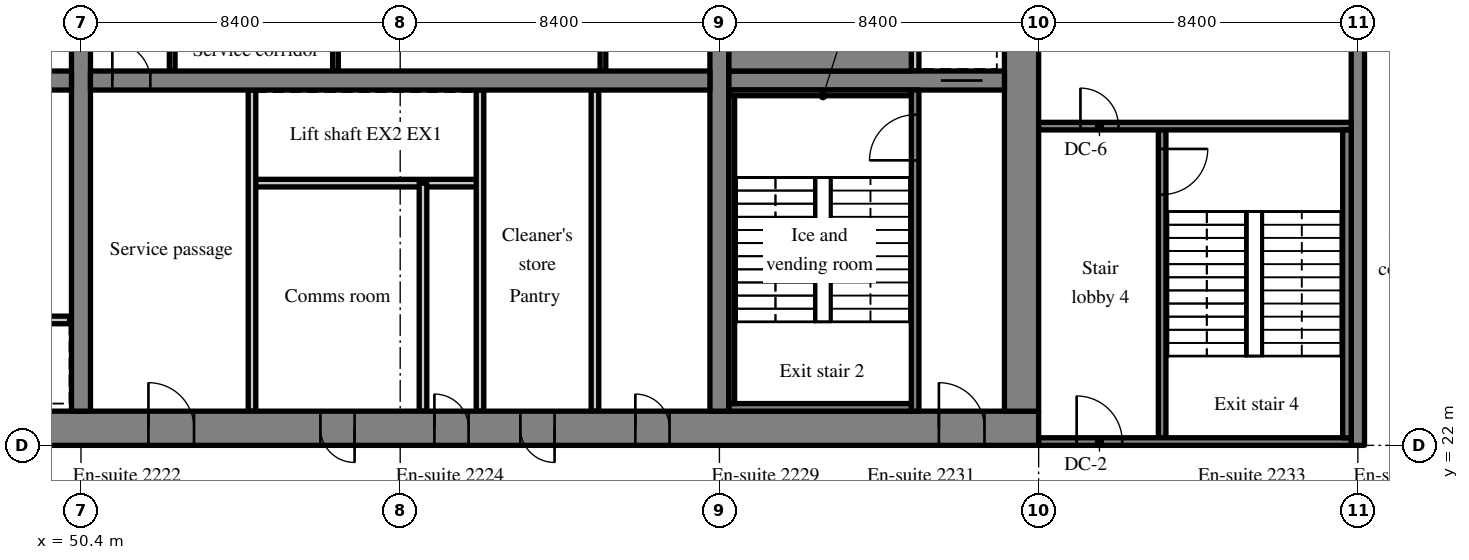
"""IFC4 building model, lengths in metres.
Left out: names, types, materials, properties, quantities, classifications, styles, units other than length and angle.
Written with IfcOpenShell. Run it as: python <this file> out.ifc"""

import sys

from ifc_helpers import new_model, si_unit, direction, frame, frame_2d, origin, place, context, subcontext, project, spatial, rectangle, extrude, source, transform, mapped, element, fill, save


model = new_model("IFC4")
c1 = context("Model", 3, precision=1e-05, world=origin(), true_north=direction((0.0, 1.0)))
c2 = subcontext(c1, "Body", "Model", "MODEL_VIEW")
j1 = project(units=[si_unit("LENGTHUNIT", "METRE"), si_unit("PLANEANGLEUNIT", "RADIAN")], contexts=[c1])
p1 = place(None, origin())
s1 = spatial("IfcSite", under=j1, at=p1, CompositionType="ELEMENT")
p2 = place(p1, origin())
s2 = spatial("IfcBuilding", under=s1, at=p2, CompositionType="ELEMENT")
p3 = place(p2, frame((0.0, 0.0, 95.2)))
s3 = spatial("IfcBuildingStorey", under=s2, at=p3, CompositionType="ELEMENT", Elevation=95.2)
m1 = source(origin(), c2, "Body", "SweptSolid", [
    extrude(rectangle(XDim=50.4, YDim=0.9, at=frame_2d((25.2, 0.0))), origin(), (0.0, 0.0, 1.0), 3.52),
])
p4 = place(p3, frame((25.2, 22.45, 0.0), z_axis=(0.0, 0.0, 1.0), x_axis=(1.0, 0.0, 0.0)))
e1 = element("IfcWall", 1, at=p4, inside=s3, PredefinedType="SHEAR", context=c2, shape_type="MappedRepresentation", body=[
    mapped(m1, transform((0.0, 0.0, 0.0), scale=1.0)),
])
m2 = source(origin(), c2, "Body", "SweptSolid", [
    extrude(rectangle(XDim=1.8, YDim=2.1, at=frame_2d((0.9, 1.05))), frame((0.0, 0.46, 0.0), z_axis=(0.0, -1.0, 0.0), x_axis=(1.0, 0.0, 0.0)), (0.0, 0.0, 1.0), 0.92),
])
p5 = place(p4, frame((15.9, 0.0, 0.0)))
e2 = element("IfcOpeningElement", 2, at=p5, cuts=e1, PredefinedType="OPENING", context=c2, shape_type="MappedRepresentation", body=[
    mapped(m2, transform((0.0, 0.0, 0.0), scale=1.0)),
])
m3 = source(origin(), c2, "Body", "SweptSolid", [
    extrude(rectangle(XDim=1.2, YDim=2.1, at=frame_2d((0.6, 1.05))), frame((0.0, 0.46, 0.0), z_axis=(0.0, -1.0, 0.0), x_axis=(1.0, 0.0, 0.0)), (0.0, 0.0, 1.0), 0.92),
])
p6 = place(p4, frame((26.975, 0.0, 0.0)))
e3 = element("IfcOpeningElement", 3, at=p6, cuts=e1, PredefinedType="OPENING", context=c2, shape_type="MappedRepresentation", body=[
    mapped(m3, transform((0.0, 0.0, 0.0), scale=1.0)),
])
m4 = source(origin(), c2, "Body", "SweptSolid", [
    extrude(rectangle(XDim=0.9, YDim=2.1, at=frame_2d((0.45, 1.05))), frame((0.0, 0.46, 0.0), z_axis=(0.0, -1.0, 0.0), x_axis=(1.0, 0.0, 0.0)), (0.0, 0.0, 1.0), 0.92),
])
p7 = place(p4, frame((34.5, 0.0, 0.0)))
e4 = element("IfcOpeningElement", 4, at=p7, cuts=e1, PredefinedType="OPENING", context=c2, shape_type="MappedRepresentation", body=[
    mapped(m4, transform((0.0, 0.0, 0.0), scale=1.0)),
])
p8 = place(p4, frame((31.5, 0.0, 0.0)))
e5 = element("IfcOpeningElement", 5, at=p8, cuts=e1, PredefinedType="OPENING", context=c2, shape_type="MappedRepresentation", body=[
    mapped(m4, transform((0.0, 0.0, 0.0), scale=1.0)),
])
p9 = place(p4, frame((39.788, 0.0, 0.0)))
e6 = element("IfcOpeningElement", 6, at=p9, cuts=e1, PredefinedType="OPENING", context=c2, shape_type="MappedRepresentation", body=[
    mapped(m4, transform((0.0, 0.0, 0.0), scale=1.0)),
])
p10 = place(p4, frame((36.762, 0.0, 0.0)))
e7 = element("IfcOpeningElement", 7, at=p10, cuts=e1, PredefinedType="OPENING", context=c2, shape_type="MappedRepresentation", body=[
    mapped(m4, transform((0.0, 0.0, 0.0), scale=1.0)),
])
p11 = place(p4, frame((6.45, 0.0, 0.0)))
e8 = element("IfcOpeningElement", 8, at=p11, cuts=e1, PredefinedType="OPENING", context=c2, shape_type="MappedRepresentation", body=[
    mapped(m3, transform((0.0, 0.0, 0.0), scale=1.0)),
])
p12 = place(p4, frame((47.775, 0.0, 0.0)))
e9 = element("IfcOpeningElement", 9, at=p12, cuts=e1, PredefinedType="OPENING", context=c2, shape_type="MappedRepresentation", body=[
    mapped(m3, transform((0.0, 0.0, 0.0), scale=1.0)),
])
m5 = source(origin(), c2, "Body", "SweptSolid", [
    extrude(rectangle(XDim=18.2, YDim=0.9, at=frame_2d((9.1, 0.0))), origin(), (0.0, 0.0, 1.0), 3.52),
])
p13 = place(p3, frame((75.15, 22.9, 0.0), z_axis=(0.0, 0.0, 1.0), x_axis=(0.0, 1.0, 0.0)))
e10 = element("IfcWall", 10, at=p13, inside=s3, PredefinedType="SHEAR", context=c2, shape_type="MappedRepresentation", body=[
    mapped(m5, transform((0.0, 0.0, 0.0), scale=1.0)),
])
p14 = place(p13, frame((12.5, 0.0, 0.0)))
e11 = element("IfcOpeningElement", 11, at=p14, cuts=e10, PredefinedType="OPENING", context=c2, shape_type="MappedRepresentation", body=[
    mapped(m3, transform((0.0, 0.0, 0.0), scale=1.0)),
])
m6 = source(origin(), c2, "Body", "SweptSolid", [
    extrude(rectangle(XDim=18.2, YDim=0.5, at=frame_2d((9.1, 0.0))), origin(), (0.0, 0.0, 1.0), 3.52),
])
p15 = place(p3, frame((50.4, 22.9, 0.0), z_axis=(0.0, 0.0, 1.0), x_axis=(0.0, 1.0, 0.0)))
e12 = element("IfcWall", 12, at=p15, inside=s3, PredefinedType="SHEAR", context=c2, shape_type="MappedRepresentation", body=[
    mapped(m6, transform((0.0, 0.0, 0.0), scale=1.0)),
])
m7 = source(origin(), c2, "Body", "SweptSolid", [
    extrude(rectangle(XDim=1.1, YDim=2.1, at=frame_2d((0.55, 1.05))), frame((0.0, 0.26, 0.0), z_axis=(0.0, -1.0, 0.0), x_axis=(1.0, 0.0, 0.0)), (0.0, 0.0, 1.0), 0.52),
])
p16 = place(p15, frame((12.55, 0.0, 0.0)))
e13 = element("IfcOpeningElement", 13, at=p16, cuts=e12, PredefinedType="OPENING", context=c2, shape_type="MappedRepresentation", body=[
    mapped(m7, transform((0.0, 0.0, 0.0), scale=1.0)),
])
p17 = place(p3, frame((67.2, 22.9, 0.0), z_axis=(0.0, 0.0, 1.0), x_axis=(0.0, 1.0, 0.0)))
e14 = element("IfcWall", 14, at=p17, inside=s3, PredefinedType="SHEAR", context=c2, shape_type="MappedRepresentation", body=[
    mapped(m6, transform((0.0, 0.0, 0.0), scale=1.0)),
])
m8 = source(origin(), c2, "Body", "SweptSolid", [
    extrude(rectangle(XDim=16.3, YDim=0.5, at=frame_2d((8.15, 0.0))), origin(), (0.0, 0.0, 1.0), 3.52),
])
p18 = place(p3, frame((33.85, 31.6, 0.0), z_axis=(0.0, 0.0, 1.0), x_axis=(1.0, 0.0, 0.0)))
e15 = element("IfcWall", 15, at=p18, inside=s3, PredefinedType="SHEAR", context=c2, shape_type="MappedRepresentation", body=[
    mapped(m8, transform((0.0, 0.0, 0.0), scale=1.0)),
])
m9 = source(origin(), c2, "Body", "SweptSolid", [
    extrude(rectangle(XDim=1.0, YDim=2.1, at=frame_2d((0.5, 1.05))), frame((0.0, 0.26, 0.0), z_axis=(0.0, -1.0, 0.0), x_axis=(1.0, 0.0, 0.0)), (0.0, 0.0, 1.0), 0.52),
])
p19 = place(p18, frame((14.725, 0.0, 0.0)))
e16 = element("IfcOpeningElement", 16, at=p19, cuts=e15, PredefinedType="OPENING", context=c2, shape_type="MappedRepresentation", body=[
    mapped(m9, transform((0.0, 0.0, 0.0), scale=1.0)),
])
m10 = source(origin(), c2, "Body", "SweptSolid", [
    extrude(rectangle(XDim=16.3, YDim=0.5, at=frame_2d((8.15, 0.0))), origin(), (0.0, 0.0, 1.0), 3.52),
])
p20 = place(p3, frame((50.65, 31.6, 0.0), z_axis=(0.0, 0.0, 1.0), x_axis=(1.0, 0.0, 0.0)))
e17 = element("IfcWall", 17, at=p20, inside=s3, PredefinedType="SHEAR", context=c2, shape_type="MappedRepresentation", body=[
    mapped(m10, transform((0.0, 0.0, 0.0), scale=1.0)),
])
p21 = place(p20, frame((0.575, 0.0, 0.0)))
e18 = element("IfcOpeningElement", 18, at=p21, cuts=e17, PredefinedType="OPENING", context=c2, shape_type="MappedRepresentation", body=[
    mapped(m9, transform((0.0, 0.0, 0.0), scale=1.0)),
])
m11 = source(origin(), c2, "Body", "SweptSolid", [
    extrude(rectangle(XDim=7.25, YDim=0.5, at=frame_2d((3.625, 0.0))), origin(), (0.0, 0.0, 1.0), 3.52),
])
p22 = place(p3, frame((67.45, 31.6, 0.0), z_axis=(0.0, 0.0, 1.0), x_axis=(1.0, 0.0, 0.0)))
e19 = element("IfcWall", 19, at=p22, inside=s3, PredefinedType="SHEAR", context=c2, shape_type="MappedRepresentation", body=[
    mapped(m11, transform((0.0, 0.0, 0.0), scale=1.0)),
])
p23 = place(p22, frame((5.575, 0.0, 0.0)))
e20 = element("IfcOpeningElement", 20, at=p23, cuts=e19, PredefinedType="OPENING", context=c2, shape_type="MappedRepresentation", body=[
    mapped(m7, transform((0.0, 0.0, 0.0), scale=1.0)),
])
m12 = source(origin(), c2, "Body", "SweptSolid", [
    extrude(rectangle(XDim=20.0, YDim=0.35, at=frame_2d((10.0, 0.0))), origin(), (0.0, 0.0, 1.0), 3.52),
])
p24 = place(p3, frame((84.0, 22.0, 0.0), z_axis=(0.0, 0.0, 1.0), x_axis=(0.0, 1.0, 0.0)))
e21 = element("IfcWall", 21, at=p24, inside=s3, PredefinedType="SHEAR", context=c2, shape_type="MappedRepresentation", body=[
    mapped(m12, transform((0.0, 0.0, 0.0), scale=1.0)),
])
m13 = source(origin(), c2, "Body", "SweptSolid", [
    extrude(rectangle(XDim=6.0, YDim=0.2, at=frame_2d((3.0, 0.0))), origin(), (0.0, 0.0, 1.0), 3.52),
])
p25 = place(p3, frame((44.1, 25.3, 0.0), z_axis=(0.0, 0.0, 1.0), x_axis=(1.0, 0.0, 0.0)))
e22 = element("IfcWall", 22, at=p25, inside=s3, PredefinedType="SOLIDWALL", context=c2, shape_type="MappedRepresentation", body=[
    mapped(m13, transform((0.0, 0.0, 0.0), scale=1.0)),
])
m14 = source(origin(), c2, "Body", "SweptSolid", [
    extrude(rectangle(XDim=1.1, YDim=2.1, at=frame_2d((0.55, 1.05))), frame((0.0, 0.11, 0.0), z_axis=(0.0, -1.0, 0.0), x_axis=(1.0, 0.0, 0.0)), (0.0, 0.0, 1.0), 0.22),
])
p26 = place(p25, frame((0.95, 0.0, 0.0)))
e23 = element("IfcOpeningElement", 23, at=p26, cuts=e22, PredefinedType="OPENING", context=c2, shape_type="MappedRepresentation", body=[
    mapped(m14, transform((0.0, 0.0, 0.0), scale=1.0)),
])
p27 = place(p25, frame((3.95, 0.0, 0.0)))
e24 = element("IfcOpeningElement", 24, at=p27, cuts=e22, PredefinedType="OPENING", context=c2, shape_type="MappedRepresentation", body=[
    mapped(m14, transform((0.0, 0.0, 0.0), scale=1.0)),
])
p28 = place(p3, frame((60.9, 28.9, 0.0), z_axis=(0.0, 0.0, 1.0), x_axis=(-1.0, 0.0, 0.0)))
e25 = element("IfcWall", 25, at=p28, inside=s3, PredefinedType="SOLIDWALL", context=c2, shape_type="MappedRepresentation", body=[
    mapped(m13, transform((0.0, 0.0, 0.0), scale=1.0)),
])
m15 = source(origin(), c2, "Body", "SweptSolid", [
    extrude(rectangle(XDim=8.45, YDim=0.2, at=frame_2d((4.225, 0.0))), origin(), (0.0, 0.0, 1.0), 3.52),
])
for number, where, z_axis, x_axis in (
    (26, (54.9, 22.9, 0.0), (0.0, 0.0, 1.0), (0.0, 1.0, 0.0)),
    (27, (60.9, 22.9, 0.0), (0.0, 0.0, 1.0), (0.0, 1.0, 0.0)),
):
    element("IfcWall", number, at=place(p3, frame(where, z_axis=z_axis, x_axis=x_axis)), inside=s3, PredefinedType="PARTITIONING", context=c2, shape_type="MappedRepresentation", body=[
        mapped(m15, transform((0.0, 0.0, 0.0), scale=1.0)),
    ])
p29 = place(p3, frame((59.4, 22.9, 0.0), z_axis=(0.0, 0.0, 1.0), x_axis=(0.0, 1.0, 0.0)))
e28 = element("IfcWall", 28, at=p29, inside=s3, PredefinedType="PARTITIONING", context=c2, shape_type="MappedRepresentation", body=[
    mapped(m13, transform((0.0, 0.0, 0.0), scale=1.0)),
])
p30 = place(p3, frame((63.925, 22.9, 0.0), z_axis=(0.0, 0.0, 1.0), x_axis=(0.0, 1.0, 0.0)))
e29 = element("IfcWall", 29, at=p30, inside=s3, PredefinedType="PARTITIONING", context=c2, shape_type="MappedRepresentation", body=[
    mapped(m15, transform((0.0, 0.0, 0.0), scale=1.0)),
])
m16 = source(origin(), c2, "Body", "SweptSolid", [
    extrude(rectangle(XDim=3.15, YDim=0.15, at=frame_2d((1.575, 0.0))), origin(), (0.0, 0.0, 1.0), 3.52),
])
for number, where, z_axis, x_axis in (
    (30, (52.8, 31.85, 0.0), (0.0, 0.0, 1.0), (0.0, 1.0, 0.0)),
    (31, (64.135, 31.85, 0.0), (0.0, 0.0, 1.0), (0.0, 1.0, 0.0)),
    (32, (57.097, 31.85, 0.0), (0.0, 0.0, 1.0), (0.0, 1.0, 0.0)),
):
    element("IfcWall", number, at=place(p3, frame(where, z_axis=z_axis, x_axis=x_axis)), inside=s3, PredefinedType="PARTITIONING", context=c2, shape_type="MappedRepresentation", body=[
        mapped(m16, transform((0.0, 0.0, 0.0), scale=1.0)),
    ])
m17 = source(origin(), c2, "Body", "SweptSolid", [
    extrude(rectangle(XDim=8.45, YDim=0.2, at=frame_2d((4.225, 0.0))), origin(), (0.0, 0.0, 1.0), 3.52),
])
p31 = place(p3, frame((72.35, 22.9, 0.0), z_axis=(0.0, 0.0, 1.0), x_axis=(0.0, 1.0, 0.0)))
e33 = element("IfcWall", 33, at=p31, inside=s3, PredefinedType="SOLIDWALL", context=c2, shape_type="MappedRepresentation", body=[
    mapped(m17, transform((0.0, 0.0, 0.0), scale=1.0)),
])
m18 = source(origin(), c2, "Body", "SweptSolid", [
    extrude(rectangle(XDim=1.2, YDim=2.1, at=frame_2d((0.6, 1.05))), frame((0.0, 0.11, 0.0), z_axis=(0.0, -1.0, 0.0), x_axis=(1.0, 0.0, 0.0)), (0.0, 0.0, 1.0), 0.22),
])
p32 = place(p31, frame((6.6, 0.0, 0.0)))
e34 = element("IfcOpeningElement", 34, at=p32, cuts=e33, PredefinedType="OPENING", context=c2, shape_type="MappedRepresentation", body=[
    mapped(m18, transform((0.0, 0.0, 0.0), scale=1.0)),
])
m19 = source(origin(), c2, "Body", "SweptSolid", [
    extrude(rectangle(XDim=1.75, YDim=0.2, at=frame_2d((0.875, 0.0))), origin(), (0.0, 0.0, 1.0), 3.52),
])
p33 = place(p3, frame((72.35, 31.85, 0.0), z_axis=(0.0, 0.0, 1.0), x_axis=(0.0, 1.0, 0.0)))
e35 = element("IfcWall", 35, at=p33, inside=s3, PredefinedType="SOLIDWALL", context=c2, shape_type="MappedRepresentation", body=[
    mapped(m19, transform((0.0, 0.0, 0.0), scale=1.0)),
])
m20 = source(origin(), c2, "Body", "SweptSolid", [
    extrude(rectangle(XDim=8.3, YDim=0.2, at=frame_2d((4.15, 0.0))), origin(), (0.0, 0.0, 1.0), 3.52),
])
p34 = place(p3, frame((78.85, 22.1, 0.0), z_axis=(0.0, 0.0, 1.0), x_axis=(0.0, 1.0, 0.0)))
e36 = element("IfcWall", 36, at=p34, inside=s3, PredefinedType="SOLIDWALL", context=c2, shape_type="MappedRepresentation", body=[
    mapped(m20, transform((0.0, 0.0, 0.0), scale=1.0)),
])
p35 = place(p34, frame((6.5, 0.0, 0.0)))
e37 = element("IfcOpeningElement", 37, at=p35, cuts=e36, PredefinedType="OPENING", context=c2, shape_type="MappedRepresentation", body=[
    mapped(m18, transform((0.0, 0.0, 0.0), scale=1.0)),
])
m21 = source(origin(), c2, "Body", "SweptSolid", [
    extrude(rectangle(XDim=8.225, YDim=0.2, at=frame_2d((4.112, 0.0))), origin(), (0.0, 0.0, 1.0), 3.52),
])
p36 = place(p3, frame((83.825, 22.1, 0.0), z_axis=(0.0, 0.0, 1.0), x_axis=(-1.0, 0.0, 0.0)))
e38 = element("IfcWall", 38, at=p36, inside=s3, PredefinedType="SOLIDWALL", context=c2, shape_type="MappedRepresentation", body=[
    mapped(m21, transform((0.0, 0.0, 0.0), scale=1.0)),
])
p37 = place(p36, frame((6.025, 0.0, 0.0)))
e39 = element("IfcOpeningElement", 39, at=p37, cuts=e38, PredefinedType="OPENING", context=c2, shape_type="MappedRepresentation", body=[
    mapped(m18, transform((0.0, 0.0, 0.0), scale=1.0)),
])
p38 = place(p3, frame((83.825, 30.4, 0.0), z_axis=(0.0, 0.0, 1.0), x_axis=(-1.0, 0.0, 0.0)))
e40 = element("IfcWall", 40, at=p38, inside=s3, PredefinedType="SOLIDWALL", context=c2, shape_type="MappedRepresentation", body=[
    mapped(m21, transform((0.0, 0.0, 0.0), scale=1.0)),
])
m22 = source(origin(), c2, "Body", "SweptSolid", [
    extrude(rectangle(XDim=1.0, YDim=2.1, at=frame_2d((0.5, 1.05))), frame((0.0, 0.11, 0.0), z_axis=(0.0, -1.0, 0.0), x_axis=(1.0, 0.0, 0.0)), (0.0, 0.0, 1.0), 0.22),
])
p39 = place(p38, frame((6.125, 0.0, 0.0)))
e41 = element("IfcOpeningElement", 41, at=p39, cuts=e40, PredefinedType="OPENING", context=c2, shape_type="MappedRepresentation", body=[
    mapped(m22, transform((0.0, 0.0, 0.0), scale=1.0)),
])
m23 = source(origin(), c2, "Body", "SweptSolid", [
    extrude(rectangle(XDim=4.8, YDim=0.2, at=frame_2d((2.4, 0.0))), origin(), (0.0, 0.0, 1.0), 3.52),
])
p40 = place(p3, frame((67.45, 23.0, 0.0), z_axis=(0.0, 0.0, 1.0), x_axis=(1.0, 0.0, 0.0)))
e42 = element("IfcWall", 42, at=p40, inside=s3, PredefinedType="SOLIDWALL", context=c2, shape_type="MappedRepresentation", body=[
    mapped(m23, transform((0.0, 0.0, 0.0), scale=1.0)),
])
m24 = source(origin(), c2, "Body", "SweptSolid", [
    extrude(rectangle(XDim=4.8, YDim=0.15, at=frame_2d((2.4, 0.0))), origin(), (0.0, 0.0, 1.0), 3.52),
])
p41 = place(p3, frame((67.45, 31.275, 0.0), z_axis=(0.0, 0.0, 1.0), x_axis=(1.0, 0.0, 0.0)))
e43 = element("IfcWall", 43, at=p41, inside=s3, PredefinedType="SOLIDWALL", context=c2, shape_type="MappedRepresentation", body=[
    mapped(m24, transform((0.0, 0.0, 0.0), scale=1.0)),
])
m25 = source(origin(), c2, "Body", "SweptSolid", [
    extrude(rectangle(XDim=8.1, YDim=0.15, at=frame_2d((4.05, 0.0))), origin(), (0.0, 0.0, 1.0), 3.52),
])
p42 = place(p3, frame((67.525, 23.1, 0.0), z_axis=(0.0, 0.0, 1.0), x_axis=(0.0, 1.0, 0.0)))
e44 = element("IfcWall", 44, at=p42, inside=s3, PredefinedType="SOLIDWALL", context=c2, shape_type="MappedRepresentation", body=[
    mapped(m25, transform((0.0, 0.0, 0.0), scale=1.0)),
])
m26 = source(origin(), c2, "Body", "SweptSolid", [
    extrude(rectangle(XDim=4.8, YDim=0.95, at=frame_2d((2.4, 0.0))), origin(), (0.0, 0.0, 1.0), 3.52),
])
p43 = place(p3, frame((67.45, 32.325, 0.0), z_axis=(0.0, 0.0, 1.0), x_axis=(1.0, 0.0, 0.0)))
e45 = element("IfcWall", 45, at=p43, inside=s3, PredefinedType="SOLIDWALL", context=c2, shape_type="MappedRepresentation", body=[
    mapped(m26, transform((0.0, 0.0, 0.0), scale=1.0)),
])
m27 = source(origin(), c2, "Body", "SweptSolid", [
    extrude(rectangle(XDim=8.1, YDim=0.225, at=frame_2d((4.05, 0.0))), origin(), (0.0, 0.0, 1.0), 3.52),
])
p44 = place(p3, frame((83.713, 22.2, 0.0), z_axis=(0.0, 0.0, 1.0), x_axis=(0.0, 1.0, 0.0)))
e46 = element("IfcWall", 46, at=p44, inside=s3, PredefinedType="SOLIDWALL", context=c2, shape_type="MappedRepresentation", body=[
    mapped(m27, transform((0.0, 0.0, 0.0), scale=1.0)),
])
m28 = source(origin(), c2, "Body", "SweptSolid", [
    extrude(rectangle(XDim=1.2, YDim=2.1, at=frame_2d((0.6, 1.05))), frame((0.0, 0.375, 0.0), z_axis=(0.0, -1.0, 0.0), x_axis=(1.0, 0.0, 0.0)), (0.0, 0.0, 1.0), 0.05),
])
p45 = place(p6, origin())
e47 = element("IfcDoor", 47, at=p45, inside=s3, OperationType="SINGLE_SWING_LEFT", PredefinedType="DOOR", context=c2, shape_type="MappedRepresentation", body=[
    mapped(m28, transform((0.0, 0.0, 0.0), scale=1.0)),
])
fill(e3, e47)
m29 = source(origin(), c2, "Body", "SweptSolid", [
    extrude(rectangle(XDim=1.0, YDim=2.1, at=frame_2d((0.5, 1.05))), frame((0.0, 0.025, 0.0), z_axis=(0.0, -1.0, 0.0), x_axis=(1.0, 0.0, 0.0)), (0.0, 0.0, 1.0), 0.05),
])
p46 = place(p21, origin())
e48 = element("IfcDoor", 48, at=p46, inside=s3, OperationType="SINGLE_SWING_LEFT", PredefinedType="DOOR", context=c2, shape_type="MappedRepresentation", body=[
    mapped(m29, transform((0.0, 0.0, 0.0), scale=1.0)),
])
fill(e18, e48)
m30 = source(origin(), c2, "Body", "SweptSolid", [
    extrude(rectangle(XDim=0.9, YDim=2.1, at=frame_2d((0.45, 1.05))), frame((0.0, 0.375, 0.0), z_axis=(0.0, -1.0, 0.0), x_axis=(1.0, 0.0, 0.0)), (0.0, 0.0, 1.0), 0.05),
])
p47 = place(p7, origin())
e49 = element("IfcDoor", 49, at=p47, inside=s3, OperationType="SINGLE_SWING_LEFT", PredefinedType="DOOR", context=c2, shape_type="MappedRepresentation", body=[
    mapped(m30, transform((0.0, 0.0, 0.0), scale=1.0)),
])
fill(e4, e49)
p48 = place(p8, origin())
e50 = element("IfcDoor", 50, at=p48, inside=s3, OperationType="SINGLE_SWING_RIGHT", PredefinedType="DOOR", context=c2, shape_type="MappedRepresentation", body=[
    mapped(m30, transform((0.0, 0.0, 0.0), scale=1.0)),
])
fill(e5, e50)
p49 = place(p9, origin())
e51 = element("IfcDoor", 51, at=p49, inside=s3, OperationType="SINGLE_SWING_LEFT", PredefinedType="DOOR", context=c2, shape_type="MappedRepresentation", body=[
    mapped(m30, transform((0.0, 0.0, 0.0), scale=1.0)),
])
fill(e6, e51)
p50 = place(p10, origin())
e52 = element("IfcDoor", 52, at=p50, inside=s3, OperationType="SINGLE_SWING_RIGHT", PredefinedType="DOOR", context=c2, shape_type="MappedRepresentation", body=[
    mapped(m30, transform((0.0, 0.0, 0.0), scale=1.0)),
])
fill(e7, e52)
m31 = source(origin(), c2, "Body", "SweptSolid", [
    extrude(rectangle(XDim=1.2, YDim=2.1, at=frame_2d((0.6, 1.05))), frame((0.0, 0.025, 0.0), z_axis=(0.0, -1.0, 0.0), x_axis=(1.0, 0.0, 0.0)), (0.0, 0.0, 1.0), 0.05),
])
p51 = place(p32, origin())
e53 = element("IfcDoor", 53, at=p51, inside=s3, OperationType="SINGLE_SWING_LEFT", PredefinedType="DOOR", context=c2, shape_type="MappedRepresentation", body=[
    mapped(m31, transform((0.0, 0.0, 0.0), scale=1.0)),
])
fill(e34, e53)
p52 = place(p12, origin())
e54 = element("IfcDoor", 54, at=p52, inside=s3, OperationType="SINGLE_SWING_LEFT", PredefinedType="DOOR", context=c2, shape_type="MappedRepresentation", body=[
    mapped(m28, transform((0.0, 0.0, 0.0), scale=1.0)),
])
fill(e9, e54)
m32 = source(origin(), c2, "Body", "SweptSolid", [
    extrude(rectangle(XDim=1.1, YDim=2.1, at=frame_2d((0.55, 1.05))), frame((0.0, 0.025, 0.0), z_axis=(0.0, -1.0, 0.0), x_axis=(1.0, 0.0, 0.0)), (0.0, 0.0, 1.0), 0.05),
])
p53 = place(p23, origin())
e55 = element("IfcDoor", 55, at=p53, inside=s3, OperationType="SLIDING_TO_RIGHT", PredefinedType="DOOR", context=c2, shape_type="MappedRepresentation", body=[
    mapped(m32, transform((0.0, 0.0, 0.0), scale=1.0)),
])
fill(e20, e55)
p54 = place(p35, origin())
e56 = element("IfcDoor", 56, at=p54, inside=s3, OperationType="SINGLE_SWING_RIGHT", PredefinedType="DOOR", context=c2, shape_type="MappedRepresentation", body=[
    mapped(m31, transform((0.0, 0.0, 0.0), scale=1.0)),
])
fill(e37, e56)
p55 = place(p37, origin())
e57 = element("IfcDoor", 57, at=p55, inside=s3, OperationType="SINGLE_SWING_RIGHT", PredefinedType="DOOR", context=c2, shape_type="MappedRepresentation", body=[
    mapped(m31, transform((0.0, 0.0, 0.0), scale=1.0)),
])
fill(e39, e57)
p56 = place(p39, origin())
e58 = element("IfcDoor", 58, at=p56, inside=s3, OperationType="SINGLE_SWING_RIGHT", PredefinedType="DOOR", context=c2, shape_type="MappedRepresentation", body=[
    mapped(m29, transform((0.0, 0.0, 0.0), scale=1.0)),
])
fill(e41, e58)
save(model, sys.argv[1])
